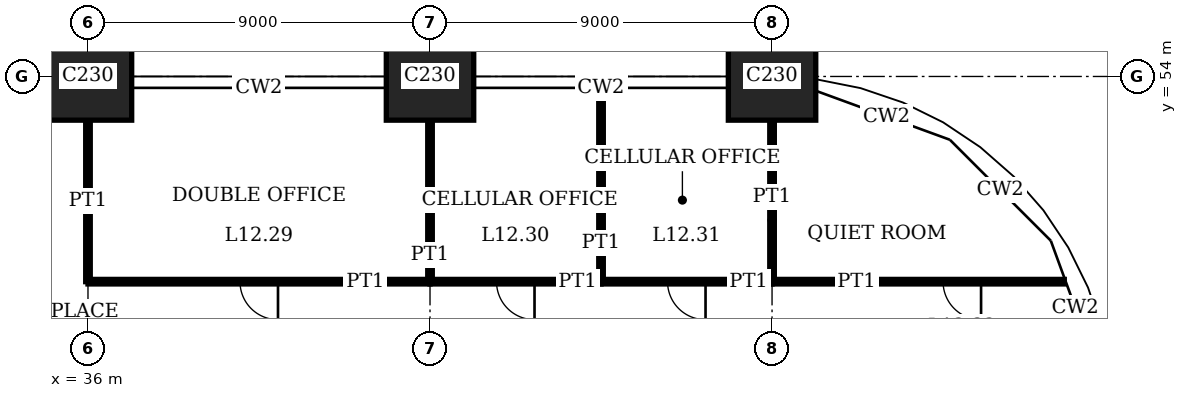
"""IFC4 building model, lengths in metres.
Left out: names, types, materials, properties, quantities, classifications, styles, units other than length and angle.
Written with IfcOpenShell. Run it as: python <this file> out.ifc"""

import sys

from ifc_helpers import new_model, si_unit, direction, frame, frame_2d, origin, origin_2d, place, context, subcontext, project, spatial, rectangle, extrude, element, fill, save


model = new_model("IFC4")
c1 = context("Model", 3, precision=1e-05, world=origin(), true_north=direction((0.0, 1.0)))
c2 = subcontext(c1, "Body", "Model", "MODEL_VIEW")
j1 = project(units=[si_unit("LENGTHUNIT", "METRE"), si_unit("PLANEANGLEUNIT", "RADIAN")], contexts=[c1])
p1 = place(None, origin())
s1 = spatial("IfcSite", under=j1, at=p1, CompositionType="ELEMENT")
p2 = place(p1, origin())
s2 = spatial("IfcBuilding", under=s1, at=p2, CompositionType="ELEMENT")
p3 = place(p2, frame((0.0, 0.0, 51.8)))
s3 = spatial("IfcBuildingStorey", under=s2, at=p3, CompositionType="ELEMENT", Elevation=51.8)
for number, where, z_axis, x_axis in (
    (1, (36.0, 54.0, 0.0), (0.0, 0.0, 1.0), (1.0, 0.0, 0.0)),
    (2, (45.0, 54.0, 0.0), (0.0, 0.0, 1.0), (1.0, 0.0, 0.0)),
    (3, (54.0, 54.0, 0.0), (0.0, 0.0, 1.0), (1.0, 0.0, 0.0)),
):
    element("IfcColumn", number, at=place(p3, frame(where, z_axis=z_axis, x_axis=x_axis)), inside=s3, PredefinedType="COLUMN", context=c2, shape_type="SweptSolid", body=[
        extrude(rectangle(XDim=2.3, YDim=2.3, at=origin_2d()), origin(), (0.0, 0.0, 1.0), 4.0),
    ])
p4 = place(p3, frame((36.0, 48.6, 0.0), z_axis=(0.0, 0.0, 1.0), x_axis=(1.0, 0.0, 0.0)))
e4 = element("IfcWall", 4, at=p4, inside=s3, PredefinedType="PARTITIONING", context=c2, shape_type="SweptSolid", body=[
    extrude(rectangle(XDim=9.0, YDim=0.12, at=frame_2d((4.5, 0.0))), origin(), (0.0, 0.0, 1.0), 3.75),
])
p5 = place(p4, frame((4.0, 0.0, 0.0)))
e5 = element("IfcOpeningElement", 5, at=p5, cuts=e4, PredefinedType="OPENING", context=c2, shape_type="SweptSolid", body=[
    extrude(rectangle(XDim=1.0, YDim=2.4, at=frame_2d((0.5, 1.2))), frame((0.0, 0.07, 0.0), z_axis=(0.0, -1.0, 0.0), x_axis=(1.0, 0.0, 0.0)), (0.0, 0.0, 1.0), 0.14),
])
p6 = place(p3, frame((45.0, 48.6, 0.0), z_axis=(0.0, 0.0, 1.0), x_axis=(1.0, 0.0, 0.0)))
e6 = element("IfcWall", 6, at=p6, inside=s3, PredefinedType="PARTITIONING", context=c2, shape_type="SweptSolid", body=[
    extrude(rectangle(XDim=4.5, YDim=0.12, at=frame_2d((2.25, 0.0))), origin(), (0.0, 0.0, 1.0), 3.75),
])
p7 = place(p6, frame((1.75, 0.0, 0.0)))
e7 = element("IfcOpeningElement", 7, at=p7, cuts=e6, PredefinedType="OPENING", context=c2, shape_type="SweptSolid", body=[
    extrude(rectangle(XDim=1.0, YDim=2.4, at=frame_2d((0.5, 1.2))), frame((0.0, 0.07, 0.0), z_axis=(0.0, -1.0, 0.0), x_axis=(1.0, 0.0, 0.0)), (0.0, 0.0, 1.0), 0.14),
])
p8 = place(p3, frame((49.5, 48.6, 0.0), z_axis=(0.0, 0.0, 1.0), x_axis=(1.0, 0.0, 0.0)))
e8 = element("IfcWall", 8, at=p8, inside=s3, PredefinedType="PARTITIONING", context=c2, shape_type="SweptSolid", body=[
    extrude(rectangle(XDim=4.5, YDim=0.12, at=frame_2d((2.25, 0.0))), origin(), (0.0, 0.0, 1.0), 3.75),
])
p9 = place(p8, frame((1.75, 0.0, 0.0)))
e9 = element("IfcOpeningElement", 9, at=p9, cuts=e8, PredefinedType="OPENING", context=c2, shape_type="SweptSolid", body=[
    extrude(rectangle(XDim=1.0, YDim=2.4, at=frame_2d((0.5, 1.2))), frame((0.0, 0.07, 0.0), z_axis=(0.0, -1.0, 0.0), x_axis=(1.0, 0.0, 0.0)), (0.0, 0.0, 1.0), 0.14),
])
p10 = place(p3, frame((54.0, 48.6, 0.0), z_axis=(0.0, 0.0, 1.0), x_axis=(1.0, 0.0, 0.0)))
e10 = element("IfcWall", 10, at=p10, inside=s3, PredefinedType="PARTITIONING", context=c2, shape_type="SweptSolid", body=[
    extrude(rectangle(XDim=7.69, YDim=0.12, at=frame_2d((3.845, 0.0))), origin(), (0.0, 0.0, 1.0), 3.75),
])
p11 = place(p10, frame((4.5, 0.0, 0.0)))
e11 = element("IfcOpeningElement", 11, at=p11, cuts=e10, PredefinedType="OPENING", context=c2, shape_type="SweptSolid", body=[
    extrude(rectangle(XDim=1.0, YDim=2.4, at=frame_2d((0.5, 1.2))), frame((0.0, 0.07, 0.0), z_axis=(0.0, -1.0, 0.0), x_axis=(1.0, 0.0, 0.0)), (0.0, 0.0, 1.0), 0.14),
])
for number, where, z_axis, x_axis in (
    (12, (36.0, 48.6, 0.0), (0.0, 0.0, 1.0), (0.0, 1.0, 0.0)),
    (13, (45.0, 48.6, 0.0), (0.0, 0.0, 1.0), (0.0, 1.0, 0.0)),
):
    element("IfcWall", number, at=place(p3, frame(where, z_axis=z_axis, x_axis=x_axis)), inside=s3, PredefinedType="PARTITIONING", context=c2, shape_type="SweptSolid", body=[
        extrude(rectangle(XDim=4.25, YDim=0.12, at=frame_2d((2.125, 0.0))), origin(), (0.0, 0.0, 1.0), 3.05),
    ])
p12 = place(p3, frame((49.5, 48.6, 0.0), z_axis=(0.0, 0.0, 1.0), x_axis=(0.0, 1.0, 0.0)))
e14 = element("IfcWall", 14, at=p12, inside=s3, PredefinedType="PARTITIONING", context=c2, shape_type="SweptSolid", body=[
    extrude(rectangle(XDim=5.09, YDim=0.12, at=frame_2d((2.545, 0.0))), origin(), (0.0, 0.0, 1.0), 3.75),
])
p13 = place(p3, frame((54.0, 48.6, 0.0), z_axis=(0.0, 0.0, 1.0), x_axis=(0.0, 1.0, 0.0)))
e15 = element("IfcWall", 15, at=p13, inside=s3, PredefinedType="PARTITIONING", context=c2, shape_type="SweptSolid", body=[
    extrude(rectangle(XDim=4.25, YDim=0.12, at=frame_2d((2.125, 0.0))), origin(), (0.0, 0.0, 1.0), 3.05),
])
p14 = place(p5, origin())
e16 = element("IfcDoor", 16, at=p14, inside=s3, OperationType="SINGLE_SWING_RIGHT", PredefinedType="DOOR", context=c2, shape_type="SweptSolid", body=[
    extrude(rectangle(XDim=1.0, YDim=2.4, at=frame_2d((0.5, 1.2))), frame((0.0, 0.025, 0.0), z_axis=(0.0, -1.0, 0.0), x_axis=(1.0, 0.0, 0.0)), (0.0, 0.0, 1.0), 0.05),
])
fill(e5, e16)
p15 = place(p7, origin())
e17 = element("IfcDoor", 17, at=p15, inside=s3, OperationType="SINGLE_SWING_RIGHT", PredefinedType="DOOR", context=c2, shape_type="SweptSolid", body=[
    extrude(rectangle(XDim=1.0, YDim=2.4, at=frame_2d((0.5, 1.2))), frame((0.0, 0.025, 0.0), z_axis=(0.0, -1.0, 0.0), x_axis=(1.0, 0.0, 0.0)), (0.0, 0.0, 1.0), 0.05),
])
fill(e7, e17)
p16 = place(p9, origin())
e18 = element("IfcDoor", 18, at=p16, inside=s3, OperationType="SINGLE_SWING_RIGHT", PredefinedType="DOOR", context=c2, shape_type="SweptSolid", body=[
    extrude(rectangle(XDim=1.0, YDim=2.4, at=frame_2d((0.5, 1.2))), frame((0.0, 0.025, 0.0), z_axis=(0.0, -1.0, 0.0), x_axis=(1.0, 0.0, 0.0)), (0.0, 0.0, 1.0), 0.05),
])
fill(e9, e18)
p17 = place(p11, origin())
e19 = element("IfcDoor", 19, at=p17, inside=s3, OperationType="SINGLE_SWING_RIGHT", PredefinedType="DOOR", context=c2, shape_type="SweptSolid", body=[
    extrude(rectangle(XDim=1.0, YDim=2.4, at=frame_2d((0.5, 1.2))), frame((0.0, 0.025, 0.0), z_axis=(0.0, -1.0, 0.0), x_axis=(1.0, 0.0, 0.0)), (0.0, 0.0, 1.0), 0.05),
])
fill(e11, e19)
save(model, sys.argv[1])
